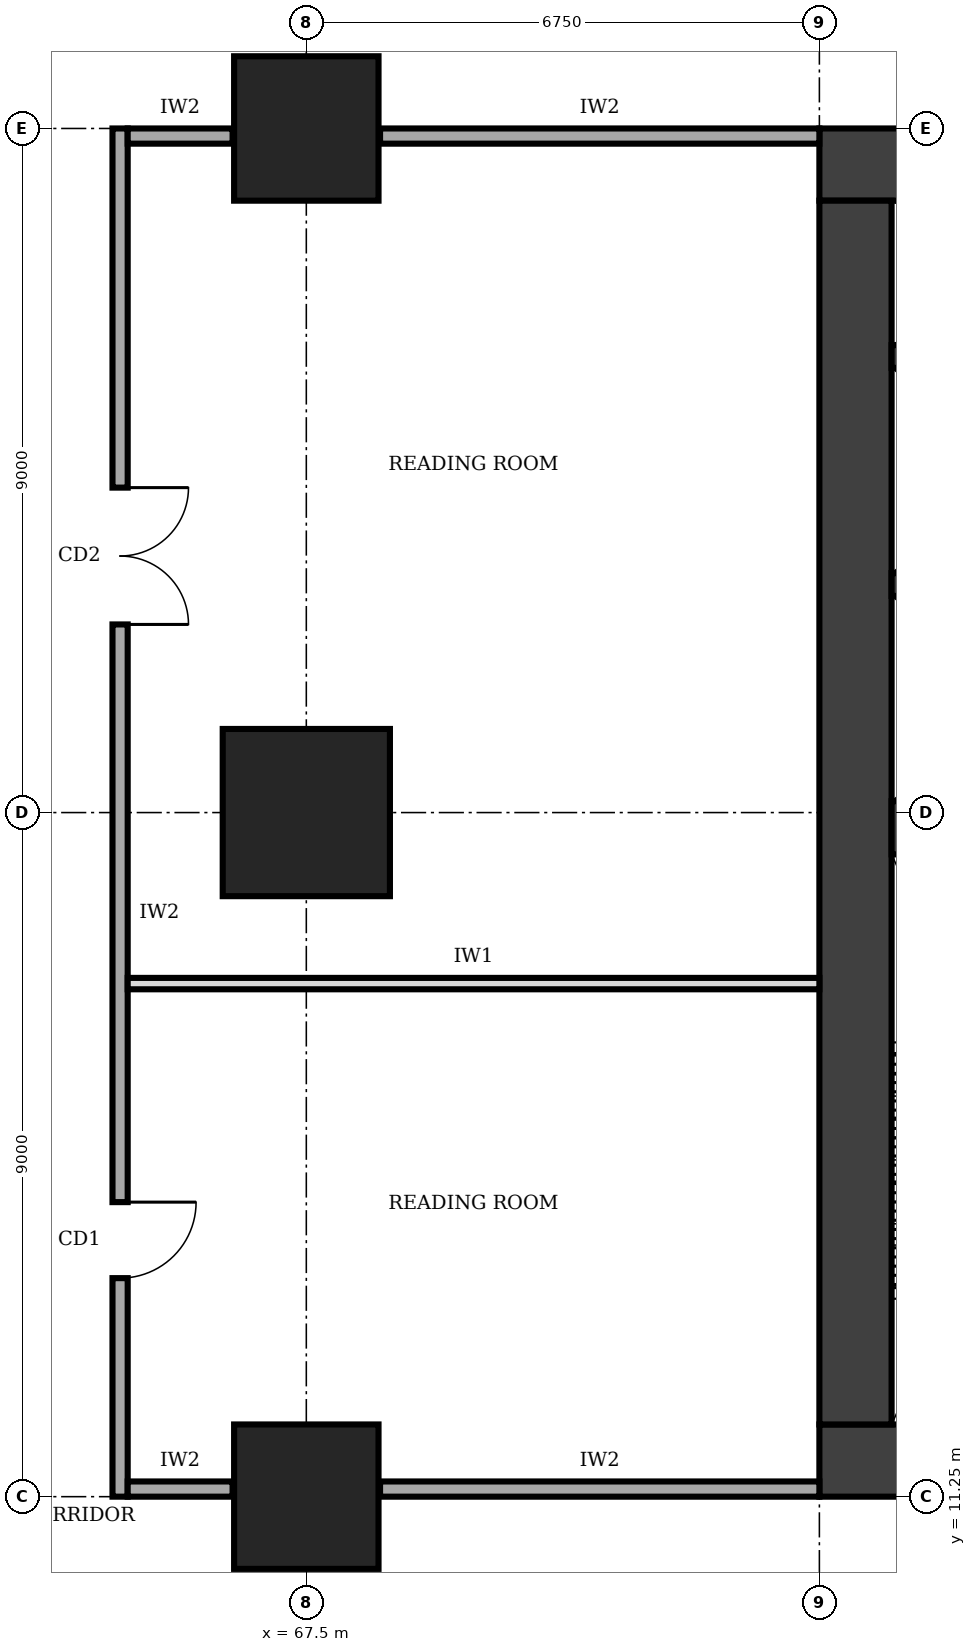
"""IFC4 building model, lengths in metres.
Left out: names, types, materials, properties, quantities, classifications, styles, units other than length and angle.
Written with IfcOpenShell. Run it as: python <this file> out.ifc"""

import sys

from ifc_helpers import new_model, si_unit, direction, frame, frame_2d, origin, origin_2d, place, context, subcontext, project, spatial, rectangle, extrude, element, fill, save


model = new_model("IFC4")
c1 = context("Model", 3, precision=1e-05, world=origin(), true_north=direction((0.0, 1.0)))
c2 = subcontext(c1, "Body", "Model", "MODEL_VIEW")
j1 = project(units=[si_unit("LENGTHUNIT", "METRE"), si_unit("PLANEANGLEUNIT", "RADIAN")], contexts=[c1])
p1 = place(None, origin())
s1 = spatial("IfcSite", under=j1, at=p1, CompositionType="ELEMENT")
p2 = place(p1, origin())
s2 = spatial("IfcBuilding", under=s1, at=p2, CompositionType="ELEMENT")
p3 = place(p2, frame((0.0, 0.0, 165.0)))
s3 = spatial("IfcBuildingStorey", under=s2, at=p3, CompositionType="ELEMENT", Elevation=165.0)
p4 = place(p3, frame((74.25, 11.725, 0.0), z_axis=(0.0, 0.0, 1.0), x_axis=(1.0, 0.0, 0.0)))
e1 = element("IfcWall", 1, at=p4, inside=s3, PredefinedType="SHEAR", context=c2, shape_type="SweptSolid", body=[
    extrude(rectangle(XDim=13.5, YDim=0.95, at=frame_2d((6.75, 0.0))), origin(), (0.0, 0.0, 1.0), 4.0),
])
p5 = place(p4, frame((4.75, 0.0, 0.0)))
e2 = element("IfcOpeningElement", 2, at=p5, cuts=e1, PredefinedType="OPENING", context=c2, shape_type="SweptSolid", body=[
    extrude(rectangle(XDim=1.0, YDim=2.1, at=frame_2d((0.5, 1.05))), frame((0.0, 0.485, 0.0), z_axis=(0.0, -1.0, 0.0), x_axis=(1.0, 0.0, 0.0)), (0.0, 0.0, 1.0), 0.97),
])
p6 = place(p3, frame((87.75, 28.775, 0.0), z_axis=(0.0, 0.0, 1.0), x_axis=(-1.0, 0.0, 0.0)))
e3 = element("IfcWall", 3, at=p6, inside=s3, PredefinedType="SHEAR", context=c2, shape_type="SweptSolid", body=[
    extrude(rectangle(XDim=13.5, YDim=0.95, at=frame_2d((6.75, 0.0))), origin(), (0.0, 0.0, 1.0), 4.0),
])
p7 = place(p6, frame((4.75, 0.0, 0.0)))
e4 = element("IfcOpeningElement", 4, at=p7, cuts=e3, PredefinedType="OPENING", context=c2, shape_type="SweptSolid", body=[
    extrude(rectangle(XDim=1.8, YDim=2.1, at=frame_2d((0.9, 1.05))), frame((0.0, 0.485, 0.0), z_axis=(0.0, -1.0, 0.0), x_axis=(1.0, 0.0, 0.0)), (0.0, 0.0, 1.0), 0.97),
])
p8 = place(p3, frame((74.725, 28.3, 0.0), z_axis=(0.0, 0.0, 1.0), x_axis=(0.0, -1.0, 0.0)))
e5 = element("IfcWall", 5, at=p8, inside=s3, PredefinedType="SHEAR", context=c2, shape_type="SweptSolid", body=[
    extrude(rectangle(XDim=16.1, YDim=0.95, at=frame_2d((8.05, 0.0))), origin(), (0.0, 0.0, 1.0), 4.0),
])
p9 = place(p3, frame((75.2, 20.05, 0.0), z_axis=(0.0, 0.0, 1.0), x_axis=(1.0, 0.0, 0.0)))
e6 = element("IfcWall", 6, at=p9, inside=s3, PredefinedType="SHEAR", context=c2, shape_type="SweptSolid", body=[
    extrude(rectangle(XDim=3.4, YDim=0.7, at=frame_2d((1.7, 0.0))), origin(), (0.0, 0.0, 1.0), 4.0),
])
for number, where, z_axis, x_axis in (
    (7, (75.2, 23.25, 0.0), (0.0, 0.0, 1.0), (1.0, 0.0, 0.0)),
    (8, (75.2, 26.25, 0.0), (0.0, 0.0, 1.0), (1.0, 0.0, 0.0)),
):
    element("IfcWall", number, at=place(p3, frame(where, z_axis=z_axis, x_axis=x_axis)), inside=s3, PredefinedType="SHEAR", context=c2, shape_type="SweptSolid", body=[
        extrude(rectangle(XDim=3.4, YDim=0.3, at=frame_2d((1.7, 0.0))), origin(), (0.0, 0.0, 1.0), 4.0),
    ])
p10 = place(p3, frame((67.5, 11.25, 0.0), z_axis=(0.0, 0.0, 1.0), x_axis=(1.0, 0.0, 0.0)))
e9 = element("IfcColumn", 9, at=p10, inside=s3, PredefinedType="COLUMN", context=c2, shape_type="SweptSolid", body=[
    extrude(rectangle(XDim=1.9, YDim=1.9, at=origin_2d()), origin(), (0.0, 0.0, 1.0), 4.0),
])
p11 = place(p3, frame((67.5, 20.25, 0.0), z_axis=(0.0, 0.0, 1.0), x_axis=(1.0, 0.0, 0.0)))
e10 = element("IfcColumn", 10, at=p11, inside=s3, PredefinedType="COLUMN", context=c2, shape_type="SweptSolid", body=[
    extrude(rectangle(XDim=2.2, YDim=2.2, at=origin_2d()), origin(), (0.0, 0.0, 1.0), 4.0),
])
p12 = place(p3, frame((67.5, 29.25, 0.0), z_axis=(0.0, 0.0, 1.0), x_axis=(1.0, 0.0, 0.0)))
e11 = element("IfcColumn", 11, at=p12, inside=s3, PredefinedType="COLUMN", context=c2, shape_type="SweptSolid", body=[
    extrude(rectangle(XDim=1.9, YDim=1.9, at=origin_2d()), origin(), (0.0, 0.0, 1.0), 4.0),
])
p13 = place(p3, frame((65.05, 29.25, 0.0), z_axis=(0.0, 0.0, 1.0), x_axis=(0.0, -1.0, 0.0)))
e12 = element("IfcWall", 12, at=p13, inside=s3, PredefinedType="SOLIDWALL", context=c2, shape_type="SweptSolid", body=[
    extrude(rectangle(XDim=18.0, YDim=0.2, at=frame_2d((9.0, 0.0))), origin(), (0.0, 0.0, 1.0), 3.75),
])
p14 = place(p13, frame((14.125, 0.0, 0.0)))
e13 = element("IfcOpeningElement", 13, at=p14, cuts=e12, PredefinedType="OPENING", context=c2, shape_type="SweptSolid", body=[
    extrude(rectangle(XDim=1.0, YDim=2.1, at=frame_2d((0.5, 1.05))), frame((0.0, 0.11, 0.0), z_axis=(0.0, -1.0, 0.0), x_axis=(1.0, 0.0, 0.0)), (0.0, 0.0, 1.0), 0.22),
])
p15 = place(p13, frame((4.725, 0.0, 0.0)))
e14 = element("IfcOpeningElement", 14, at=p15, cuts=e12, PredefinedType="OPENING", context=c2, shape_type="SweptSolid", body=[
    extrude(rectangle(XDim=1.8, YDim=2.1, at=frame_2d((0.9, 1.05))), frame((0.0, 0.11, 0.0), z_axis=(0.0, -1.0, 0.0), x_axis=(1.0, 0.0, 0.0)), (0.0, 0.0, 1.0), 0.22),
])
p16 = place(p3, frame((65.15, 11.35, 0.0), z_axis=(0.0, 0.0, 1.0), x_axis=(1.0, 0.0, 0.0)))
e15 = element("IfcWall", 15, at=p16, inside=s3, PredefinedType="SOLIDWALL", context=c2, shape_type="SweptSolid", body=[
    extrude(rectangle(XDim=1.38, YDim=0.2, at=frame_2d((0.69, 0.0))), origin(), (0.0, 0.0, 1.0), 2.75),
])
p17 = place(p3, frame((68.47, 11.35, 0.0), z_axis=(0.0, 0.0, 1.0), x_axis=(1.0, 0.0, 0.0)))
e16 = element("IfcWall", 16, at=p17, inside=s3, PredefinedType="SOLIDWALL", context=c2, shape_type="SweptSolid", body=[
    extrude(rectangle(XDim=5.78, YDim=0.2, at=frame_2d((2.89, 0.0))), origin(), (0.0, 0.0, 1.0), 3.75),
])
p18 = place(p3, frame((65.15, 29.15, 0.0), z_axis=(0.0, 0.0, 1.0), x_axis=(1.0, 0.0, 0.0)))
e17 = element("IfcWall", 17, at=p18, inside=s3, PredefinedType="SOLIDWALL", context=c2, shape_type="SweptSolid", body=[
    extrude(rectangle(XDim=1.38, YDim=0.2, at=frame_2d((0.69, 0.0))), origin(), (0.0, 0.0, 1.0), 2.75),
])
p19 = place(p3, frame((68.47, 29.15, 0.0), z_axis=(0.0, 0.0, 1.0), x_axis=(1.0, 0.0, 0.0)))
e18 = element("IfcWall", 18, at=p19, inside=s3, PredefinedType="SOLIDWALL", context=c2, shape_type="SweptSolid", body=[
    extrude(rectangle(XDim=5.78, YDim=0.2, at=frame_2d((2.89, 0.0))), origin(), (0.0, 0.0, 1.0), 3.75),
])
p20 = place(p3, frame((65.15, 18.0, 0.0), z_axis=(0.0, 0.0, 1.0), x_axis=(1.0, 0.0, 0.0)))
e19 = element("IfcWall", 19, at=p20, inside=s3, PredefinedType="PARTITIONING", context=c2, shape_type="SweptSolid", body=[
    extrude(rectangle(XDim=9.1, YDim=0.15, at=frame_2d((4.55, 0.0))), origin(), (0.0, 0.0, 1.0), 3.75),
])
p21 = place(p14, origin())
e20 = element("IfcDoor", 20, at=p21, inside=s3, OperationType="SINGLE_SWING_LEFT", PredefinedType="DOOR", context=c2, shape_type="SweptSolid", body=[
    extrude(rectangle(XDim=1.0, YDim=2.1, at=frame_2d((0.5, 1.05))), frame((0.0, 0.025, 0.0), z_axis=(0.0, -1.0, 0.0), x_axis=(1.0, 0.0, 0.0)), (0.0, 0.0, 1.0), 0.05),
])
fill(e13, e20)
p22 = place(p15, origin())
e21 = element("IfcDoor", 21, at=p22, inside=s3, OperationType="DOUBLE_DOOR_SINGLE_SWING", PredefinedType="DOOR", context=c2, shape_type="SweptSolid", body=[
    extrude(rectangle(XDim=1.8, YDim=2.1, at=frame_2d((0.9, 1.05))), frame((0.0, 0.025, 0.0), z_axis=(0.0, -1.0, 0.0), x_axis=(1.0, 0.0, 0.0)), (0.0, 0.0, 1.0), 0.05),
])
fill(e14, e21)
save(model, sys.argv[1])
